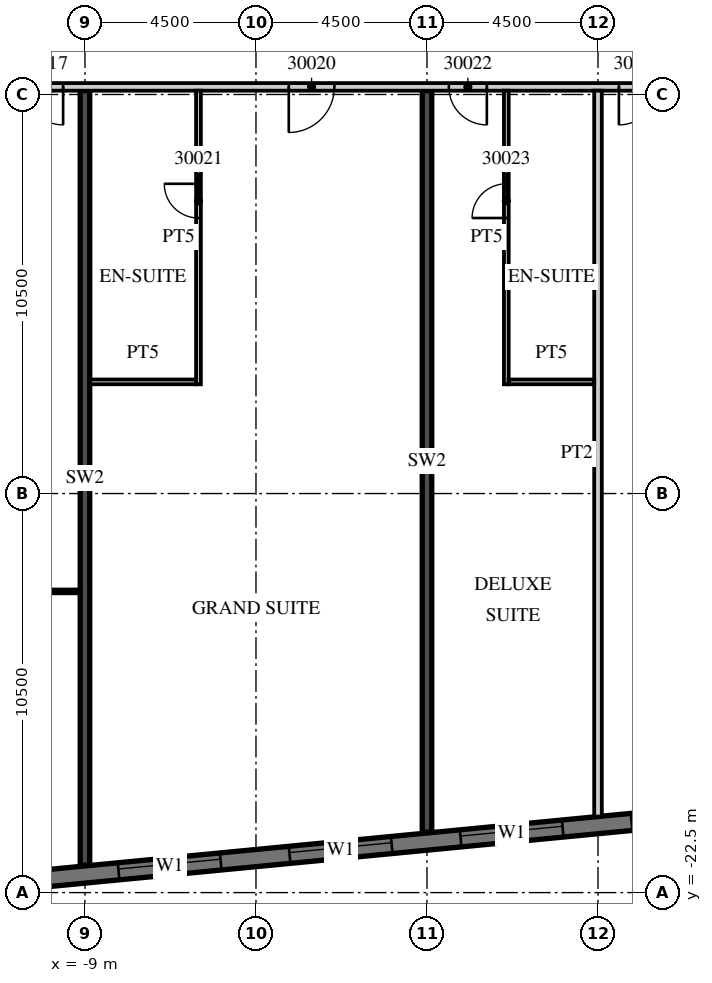
"""IFC4 building model, lengths in metres.
Left out: names, types, materials, properties, quantities, classifications, styles, units other than length and angle.
Written with IfcOpenShell. Run it as: python <this file> out.ifc"""

import sys

from ifc_helpers import new_model, si_unit, direction, frame, frame_2d, origin, place, context, subcontext, project, spatial, rectangle, extrude, element, fill, save


model = new_model("IFC4")
c1 = context("Model", 3, precision=1e-05, world=origin(), true_north=direction((0.0, 1.0)))
c2 = subcontext(c1, "Body", "Model", "MODEL_VIEW")
j1 = project(units=[si_unit("LENGTHUNIT", "METRE"), si_unit("PLANEANGLEUNIT", "RADIAN")], contexts=[c1])
p1 = place(None, origin())
s1 = spatial("IfcSite", under=j1, at=p1, CompositionType="ELEMENT")
p2 = place(p1, origin())
s2 = spatial("IfcBuilding", under=s1, at=p2, CompositionType="ELEMENT")
p3 = place(p2, frame((0.0, 0.0, 133.9)))
s3 = spatial("IfcBuildingStorey", under=s2, at=p3, CompositionType="ELEMENT", Elevation=133.9)
p4 = place(p3, frame((-9.0, -21.777, 0.0), z_axis=(0.0, 0.0, 1.0), x_axis=(0.0, 1.0, 0.0)))
e1 = element("IfcWall", 1, at=p4, inside=s3, PredefinedType="SHEAR", context=c2, shape_type="SweptSolid", body=[
    extrude(rectangle(XDim=20.377, YDim=0.25, at=frame_2d((10.188, 0.0))), origin(), (0.0, 0.0, 1.0), 3.3),
])
p5 = place(p3, frame((0.0, -20.91, 0.0), z_axis=(0.0, 0.0, 1.0), x_axis=(0.0, 1.0, 0.0)))
e2 = element("IfcWall", 2, at=p5, inside=s3, PredefinedType="SHEAR", context=c2, shape_type="SweptSolid", body=[
    extrude(rectangle(XDim=19.51, YDim=0.25, at=frame_2d((9.755, 0.0))), origin(), (0.0, 0.0, 1.0), 3.3),
])
p6 = place(p3, frame((-13.521, -22.46, 0.0), z_axis=(0.0, 0.0, 1.0), x_axis=(0.995396096335, 0.095846812164, 0.0)))
e3 = element("IfcWall", 3, at=p6, inside=s3, PredefinedType="SOLIDWALL", context=c2, shape_type="SweptSolid", body=[
    extrude(rectangle(XDim=59.151, YDim=0.45, at=frame_2d((29.575, 0.0))), origin(), (0.0, 0.0, 1.0), 3.02),
])
p7 = place(p6, frame((0.91, 0.0, 0.45)))
e4 = element("IfcOpeningElement", 4, at=p7, cuts=e3, PredefinedType="OPENING", context=c2, shape_type="SweptSolid", body=[
    extrude(rectangle(XDim=2.7, YDim=2.25, at=frame_2d((1.35, 1.125))), frame((0.0, 0.235, 0.0), z_axis=(0.0, -1.0, 0.0), x_axis=(1.0, 0.0, 0.0)), (0.0, 0.0, 1.0), 0.47),
])
p8 = place(p6, frame((5.431, 0.0, 0.45)))
e5 = element("IfcOpeningElement", 5, at=p8, cuts=e3, PredefinedType="OPENING", context=c2, shape_type="SweptSolid", body=[
    extrude(rectangle(XDim=2.7, YDim=2.25, at=frame_2d((1.35, 1.125))), frame((0.0, 0.235, 0.0), z_axis=(0.0, -1.0, 0.0), x_axis=(1.0, 0.0, 0.0)), (0.0, 0.0, 1.0), 0.47),
])
p9 = place(p6, frame((9.952, 0.0, 0.45)))
e6 = element("IfcOpeningElement", 6, at=p9, cuts=e3, PredefinedType="OPENING", context=c2, shape_type="SweptSolid", body=[
    extrude(rectangle(XDim=2.7, YDim=2.25, at=frame_2d((1.35, 1.125))), frame((0.0, 0.235, 0.0), z_axis=(0.0, -1.0, 0.0), x_axis=(1.0, 0.0, 0.0)), (0.0, 0.0, 1.0), 0.47),
])
p10 = place(p6, frame((14.473, 0.0, 0.45)))
e7 = element("IfcOpeningElement", 7, at=p10, cuts=e3, PredefinedType="OPENING", context=c2, shape_type="SweptSolid", body=[
    extrude(rectangle(XDim=2.7, YDim=2.25, at=frame_2d((1.35, 1.125))), frame((0.0, 0.235, 0.0), z_axis=(0.0, -1.0, 0.0), x_axis=(1.0, 0.0, 0.0)), (0.0, 0.0, 1.0), 0.47),
])
p11 = place(p6, frame((18.994, 0.0, 0.45)))
e8 = element("IfcOpeningElement", 8, at=p11, cuts=e3, PredefinedType="OPENING", context=c2, shape_type="SweptSolid", body=[
    extrude(rectangle(XDim=2.7, YDim=2.25, at=frame_2d((1.35, 1.125))), frame((0.0, 0.235, 0.0), z_axis=(0.0, -1.0, 0.0), x_axis=(1.0, 0.0, 0.0)), (0.0, 0.0, 1.0), 0.47),
])
p12 = place(p6, frame((23.514, 0.0, 0.45)))
e9 = element("IfcOpeningElement", 9, at=p12, cuts=e3, PredefinedType="OPENING", context=c2, shape_type="SweptSolid", body=[
    extrude(rectangle(XDim=2.7, YDim=2.25, at=frame_2d((1.35, 1.125))), frame((0.0, 0.235, 0.0), z_axis=(0.0, -1.0, 0.0), x_axis=(1.0, 0.0, 0.0)), (0.0, 0.0, 1.0), 0.47),
])
p13 = place(p6, frame((28.035, 0.0, 0.45)))
e10 = element("IfcOpeningElement", 10, at=p13, cuts=e3, PredefinedType="OPENING", context=c2, shape_type="SweptSolid", body=[
    extrude(rectangle(XDim=2.7, YDim=2.25, at=frame_2d((1.35, 1.125))), frame((0.0, 0.235, 0.0), z_axis=(0.0, -1.0, 0.0), x_axis=(1.0, 0.0, 0.0)), (0.0, 0.0, 1.0), 0.47),
])
p14 = place(p6, frame((32.556, 0.0, 0.45)))
e11 = element("IfcOpeningElement", 11, at=p14, cuts=e3, PredefinedType="OPENING", context=c2, shape_type="SweptSolid", body=[
    extrude(rectangle(XDim=2.7, YDim=2.25, at=frame_2d((1.35, 1.125))), frame((0.0, 0.235, 0.0), z_axis=(0.0, -1.0, 0.0), x_axis=(1.0, 0.0, 0.0)), (0.0, 0.0, 1.0), 0.47),
])
p15 = place(p6, frame((37.077, 0.0, 0.45)))
e12 = element("IfcOpeningElement", 12, at=p15, cuts=e3, PredefinedType="OPENING", context=c2, shape_type="SweptSolid", body=[
    extrude(rectangle(XDim=2.7, YDim=2.25, at=frame_2d((1.35, 1.125))), frame((0.0, 0.235, 0.0), z_axis=(0.0, -1.0, 0.0), x_axis=(1.0, 0.0, 0.0)), (0.0, 0.0, 1.0), 0.47),
])
p16 = place(p6, frame((41.598, 0.0, 0.45)))
e13 = element("IfcOpeningElement", 13, at=p16, cuts=e3, PredefinedType="OPENING", context=c2, shape_type="SweptSolid", body=[
    extrude(rectangle(XDim=2.7, YDim=2.25, at=frame_2d((1.35, 1.125))), frame((0.0, 0.235, 0.0), z_axis=(0.0, -1.0, 0.0), x_axis=(1.0, 0.0, 0.0)), (0.0, 0.0, 1.0), 0.47),
])
p17 = place(p6, frame((46.118, 0.0, 0.45)))
e14 = element("IfcOpeningElement", 14, at=p17, cuts=e3, PredefinedType="OPENING", context=c2, shape_type="SweptSolid", body=[
    extrude(rectangle(XDim=2.7, YDim=2.25, at=frame_2d((1.35, 1.125))), frame((0.0, 0.235, 0.0), z_axis=(0.0, -1.0, 0.0), x_axis=(1.0, 0.0, 0.0)), (0.0, 0.0, 1.0), 0.47),
])
p18 = place(p6, frame((50.639, 0.0, 0.45)))
e15 = element("IfcOpeningElement", 15, at=p18, cuts=e3, PredefinedType="OPENING", context=c2, shape_type="SweptSolid", body=[
    extrude(rectangle(XDim=2.7, YDim=2.25, at=frame_2d((1.35, 1.125))), frame((0.0, 0.235, 0.0), z_axis=(0.0, -1.0, 0.0), x_axis=(1.0, 0.0, 0.0)), (0.0, 0.0, 1.0), 0.47),
])
p19 = place(p6, frame((55.15, 0.0, 0.45)))
e16 = element("IfcOpeningElement", 16, at=p19, cuts=e3, PredefinedType="OPENING", context=c2, shape_type="SweptSolid", body=[
    extrude(rectangle(XDim=2.7, YDim=2.25, at=frame_2d((1.35, 1.125))), frame((0.0, 0.235, 0.0), z_axis=(0.0, -1.0, 0.0), x_axis=(1.0, 0.0, 0.0)), (0.0, 0.0, 1.0), 0.47),
])
p20 = place(p3, frame((-13.5, -1.3, 0.0), z_axis=(0.0, 0.0, 1.0), x_axis=(1.0, 0.0, 0.0)))
e17 = element("IfcWall", 17, at=p20, inside=s3, PredefinedType="PARTITIONING", context=c2, shape_type="SweptSolid", body=[
    extrude(rectangle(XDim=60.932, YDim=0.2, at=frame_2d((30.466, 0.0))), origin(), (0.0, 0.0, 1.0), 3.02),
])
p21 = place(p20, frame((2.925, 0.0, 0.0)))
e18 = element("IfcOpeningElement", 18, at=p21, cuts=e17, PredefinedType="OPENING", context=c2, shape_type="SweptSolid", body=[
    extrude(rectangle(XDim=1.0, YDim=2.1, at=frame_2d((0.5, 1.05))), frame((0.0, 0.11, 0.0), z_axis=(0.0, -1.0, 0.0), x_axis=(1.0, 0.0, 0.0)), (0.0, 0.0, 1.0), 0.22),
])
p22 = place(p20, frame((9.863, 0.0, 0.0)))
e19 = element("IfcOpeningElement", 19, at=p22, cuts=e17, PredefinedType="OPENING", context=c2, shape_type="SweptSolid", body=[
    extrude(rectangle(XDim=1.2, YDim=2.1, at=frame_2d((0.6, 1.05))), frame((0.0, 0.11, 0.0), z_axis=(0.0, -1.0, 0.0), x_axis=(1.0, 0.0, 0.0)), (0.0, 0.0, 1.0), 0.22),
])
p23 = place(p20, frame((14.075, 0.0, 0.0)))
e20 = element("IfcOpeningElement", 20, at=p23, cuts=e17, PredefinedType="OPENING", context=c2, shape_type="SweptSolid", body=[
    extrude(rectangle(XDim=1.0, YDim=2.1, at=frame_2d((0.5, 1.05))), frame((0.0, 0.11, 0.0), z_axis=(0.0, -1.0, 0.0), x_axis=(1.0, 0.0, 0.0)), (0.0, 0.0, 1.0), 0.22),
])
p24 = place(p20, frame((18.55, 0.0, 0.0)))
e21 = element("IfcOpeningElement", 21, at=p24, cuts=e17, PredefinedType="OPENING", context=c2, shape_type="SweptSolid", body=[
    extrude(rectangle(XDim=1.0, YDim=2.1, at=frame_2d((0.5, 1.05))), frame((0.0, 0.11, 0.0), z_axis=(0.0, -1.0, 0.0), x_axis=(1.0, 0.0, 0.0)), (0.0, 0.0, 1.0), 0.22),
])
p25 = place(p20, frame((24.938, 0.0, 0.0)))
e22 = element("IfcOpeningElement", 22, at=p25, cuts=e17, PredefinedType="OPENING", context=c2, shape_type="SweptSolid", body=[
    extrude(rectangle(XDim=1.2, YDim=2.1, at=frame_2d((0.6, 1.05))), frame((0.0, 0.11, 0.0), z_axis=(0.0, -1.0, 0.0), x_axis=(1.0, 0.0, 0.0)), (0.0, 0.0, 1.0), 0.22),
])
p26 = place(p20, frame((36.862, 0.0, 0.0)))
e23 = element("IfcOpeningElement", 23, at=p26, cuts=e17, PredefinedType="OPENING", context=c2, shape_type="SweptSolid", body=[
    extrude(rectangle(XDim=1.2, YDim=2.1, at=frame_2d((0.6, 1.05))), frame((0.0, 0.11, 0.0), z_axis=(0.0, -1.0, 0.0), x_axis=(1.0, 0.0, 0.0)), (0.0, 0.0, 1.0), 0.22),
])
p27 = place(p20, frame((41.075, 0.0, 0.0)))
e24 = element("IfcOpeningElement", 24, at=p27, cuts=e17, PredefinedType="OPENING", context=c2, shape_type="SweptSolid", body=[
    extrude(rectangle(XDim=1.0, YDim=2.1, at=frame_2d((0.5, 1.05))), frame((0.0, 0.11, 0.0), z_axis=(0.0, -1.0, 0.0), x_axis=(1.0, 0.0, 0.0)), (0.0, 0.0, 1.0), 0.22),
])
p28 = place(p20, frame((45.55, 0.0, 0.0)))
e25 = element("IfcOpeningElement", 25, at=p28, cuts=e17, PredefinedType="OPENING", context=c2, shape_type="SweptSolid", body=[
    extrude(rectangle(XDim=1.0, YDim=2.1, at=frame_2d((0.5, 1.05))), frame((0.0, 0.11, 0.0), z_axis=(0.0, -1.0, 0.0), x_axis=(1.0, 0.0, 0.0)), (0.0, 0.0, 1.0), 0.22),
])
p29 = place(p20, frame((52.425, 0.0, 0.0)))
e26 = element("IfcOpeningElement", 26, at=p29, cuts=e17, PredefinedType="OPENING", context=c2, shape_type="SweptSolid", body=[
    extrude(rectangle(XDim=1.0, YDim=2.1, at=frame_2d((0.5, 1.05))), frame((0.0, 0.11, 0.0), z_axis=(0.0, -1.0, 0.0), x_axis=(1.0, 0.0, 0.0)), (0.0, 0.0, 1.0), 0.22),
])
p30 = place(p20, frame((56.95, 0.0, 0.0)))
e27 = element("IfcOpeningElement", 27, at=p30, cuts=e17, PredefinedType="OPENING", context=c2, shape_type="SweptSolid", body=[
    extrude(rectangle(XDim=1.0, YDim=2.1, at=frame_2d((0.5, 1.05))), frame((0.0, 0.11, 0.0), z_axis=(0.0, -1.0, 0.0), x_axis=(1.0, 0.0, 0.0)), (0.0, 0.0, 1.0), 0.22),
])
p31 = place(p20, frame((59.882, 0.0, 0.0)))
e28 = element("IfcOpeningElement", 28, at=p31, cuts=e17, PredefinedType="OPENING", context=c2, shape_type="SweptSolid", body=[
    extrude(rectangle(XDim=0.9, YDim=2.1, at=frame_2d((0.45, 1.05))), frame((0.0, 0.11, 0.0), z_axis=(0.0, -1.0, 0.0), x_axis=(1.0, 0.0, 0.0)), (0.0, 0.0, 1.0), 0.22),
])
p32 = place(p3, frame((-13.4, -14.575, 0.0), z_axis=(0.0, 0.0, 1.0), x_axis=(1.0, 0.0, 0.0)))
e29 = element("IfcWall", 29, at=p32, inside=s3, PredefinedType="PARTITIONING", context=c2, shape_type="SweptSolid", body=[
    extrude(rectangle(XDim=4.275, YDim=0.1, at=frame_2d((2.137, 0.0))), origin(), (0.0, 0.0, 1.0), 3.02),
])
p33 = place(p32, frame((0.788, 0.0, 0.0)))
e30 = element("IfcOpeningElement", 30, at=p33, cuts=e29, PredefinedType="OPENING", context=c2, shape_type="SweptSolid", body=[
    extrude(rectangle(XDim=1.5, YDim=2.1, at=frame_2d((0.75, 1.05))), frame((0.0, 0.06, 0.0), z_axis=(0.0, -1.0, 0.0), x_axis=(1.0, 0.0, 0.0)), (0.0, 0.0, 1.0), 0.12),
])
p34 = place(p3, frame((-6.013, -9.125, 0.0), z_axis=(0.0, 0.0, 1.0), x_axis=(0.0, 1.0, 0.0)))
e31 = element("IfcWall", 31, at=p34, inside=s3, PredefinedType="PARTITIONING", context=c2, shape_type="SweptSolid", body=[
    extrude(rectangle(XDim=7.725, YDim=0.125, at=frame_2d((3.863, 0.0))), origin(), (0.0, 0.0, 1.0), 3.02),
])
p35 = place(p34, frame((4.375, 0.0, 0.0)))
e32 = element("IfcOpeningElement", 32, at=p35, cuts=e31, PredefinedType="OPENING", context=c2, shape_type="SweptSolid", body=[
    extrude(rectangle(XDim=0.9, YDim=2.1, at=frame_2d((0.45, 1.05))), frame((0.0, 0.073, 0.0), z_axis=(0.0, -1.0, 0.0), x_axis=(1.0, 0.0, 0.0)), (0.0, 0.0, 1.0), 0.145),
])
p36 = place(p3, frame((-8.875, -9.062, 0.0), z_axis=(0.0, 0.0, 1.0), x_axis=(1.0, 0.0, 0.0)))
e33 = element("IfcWall", 33, at=p36, inside=s3, PredefinedType="PARTITIONING", context=c2, shape_type="SweptSolid", body=[
    extrude(rectangle(XDim=2.8, YDim=0.125, at=frame_2d((1.4, 0.0))), origin(), (0.0, 0.0, 1.0), 3.02),
])
p37 = place(p3, frame((4.5, -20.499, 0.0), z_axis=(0.0, 0.0, 1.0), x_axis=(0.0, 1.0, 0.0)))
e34 = element("IfcWall", 34, at=p37, inside=s3, PredefinedType="PARTITIONING", context=c2, shape_type="SweptSolid", body=[
    extrude(rectangle(XDim=19.099, YDim=0.2, at=frame_2d((9.55, 0.0))), origin(), (0.0, 0.0, 1.0), 3.02),
])
p38 = place(p3, frame((2.087, -9.125, 0.0), z_axis=(0.0, 0.0, 1.0), x_axis=(0.0, 1.0, 0.0)))
e35 = element("IfcWall", 35, at=p38, inside=s3, PredefinedType="PARTITIONING", context=c2, shape_type="SweptSolid", body=[
    extrude(rectangle(XDim=7.725, YDim=0.125, at=frame_2d((3.863, 0.0))), origin(), (0.0, 0.0, 1.0), 3.02),
])
p39 = place(p38, frame((4.375, 0.0, 0.0)))
e36 = element("IfcOpeningElement", 36, at=p39, cuts=e35, PredefinedType="OPENING", context=c2, shape_type="SweptSolid", body=[
    extrude(rectangle(XDim=0.9, YDim=2.1, at=frame_2d((0.45, 1.05))), frame((0.0, 0.073, 0.0), z_axis=(0.0, -1.0, 0.0), x_axis=(1.0, 0.0, 0.0)), (0.0, 0.0, 1.0), 0.145),
])
p40 = place(p3, frame((2.15, -9.062, 0.0), z_axis=(0.0, 0.0, 1.0), x_axis=(1.0, 0.0, 0.0)))
e37 = element("IfcWall", 37, at=p40, inside=s3, PredefinedType="PARTITIONING", context=c2, shape_type="SweptSolid", body=[
    extrude(rectangle(XDim=2.25, YDim=0.125, at=frame_2d((1.125, 0.0))), origin(), (0.0, 0.0, 1.0), 3.02),
])
p41 = place(p8, origin())
e38 = element("IfcWindow", 38, at=p41, inside=s3, PartitioningType="SINGLE_PANEL", PredefinedType="WINDOW", context=c2, shape_type="SweptSolid", body=[
    extrude(rectangle(XDim=2.7, YDim=2.25, at=frame_2d((1.35, 1.125))), frame((0.0, 0.09, 0.0), z_axis=(0.0, -1.0, 0.0), x_axis=(1.0, 0.0, 0.0)), (0.0, 0.0, 1.0), 0.06),
])
fill(e5, e38)
p42 = place(p9, origin())
e39 = element("IfcWindow", 39, at=p42, inside=s3, PartitioningType="SINGLE_PANEL", PredefinedType="WINDOW", context=c2, shape_type="SweptSolid", body=[
    extrude(rectangle(XDim=2.7, YDim=2.25, at=frame_2d((1.35, 1.125))), frame((0.0, 0.09, 0.0), z_axis=(0.0, -1.0, 0.0), x_axis=(1.0, 0.0, 0.0)), (0.0, 0.0, 1.0), 0.06),
])
fill(e6, e39)
p43 = place(p10, origin())
e40 = element("IfcWindow", 40, at=p43, inside=s3, PartitioningType="SINGLE_PANEL", PredefinedType="WINDOW", context=c2, shape_type="SweptSolid", body=[
    extrude(rectangle(XDim=2.7, YDim=2.25, at=frame_2d((1.35, 1.125))), frame((0.0, 0.09, 0.0), z_axis=(0.0, -1.0, 0.0), x_axis=(1.0, 0.0, 0.0)), (0.0, 0.0, 1.0), 0.06),
])
fill(e7, e40)
p44 = place(p11, origin())
e41 = element("IfcWindow", 41, at=p44, inside=s3, PartitioningType="SINGLE_PANEL", PredefinedType="WINDOW", context=c2, shape_type="SweptSolid", body=[
    extrude(rectangle(XDim=2.7, YDim=2.25, at=frame_2d((1.35, 1.125))), frame((0.0, 0.09, 0.0), z_axis=(0.0, -1.0, 0.0), x_axis=(1.0, 0.0, 0.0)), (0.0, 0.0, 1.0), 0.06),
])
fill(e8, e41)
p45 = place(p21, origin())
e42 = element("IfcDoor", 42, at=p45, inside=s3, OperationType="SINGLE_SWING_RIGHT", PredefinedType="DOOR", context=c2, shape_type="SweptSolid", body=[
    extrude(rectangle(XDim=1.0, YDim=2.1, at=frame_2d((0.5, 1.05))), frame((0.0, 0.025, 0.0), z_axis=(0.0, -1.0, 0.0), x_axis=(1.0, 0.0, 0.0)), (0.0, 0.0, 1.0), 0.05),
])
fill(e18, e42)
p46 = place(p22, origin())
e43 = element("IfcDoor", 43, at=p46, inside=s3, OperationType="SINGLE_SWING_LEFT", PredefinedType="DOOR", context=c2, shape_type="SweptSolid", body=[
    extrude(rectangle(XDim=1.2, YDim=2.1, at=frame_2d((0.6, 1.05))), frame((0.0, 0.025, 0.0), z_axis=(0.0, -1.0, 0.0), x_axis=(1.0, 0.0, 0.0)), (0.0, 0.0, 1.0), 0.05),
])
fill(e19, e43)
p47 = place(p35, origin())
e44 = element("IfcDoor", 44, at=p47, inside=s3, OperationType="SINGLE_SWING_RIGHT", PredefinedType="DOOR", context=c2, shape_type="SweptSolid", body=[
    extrude(rectangle(XDim=0.9, YDim=2.1, at=frame_2d((0.45, 1.05))), frame((0.0, 0.025, 0.0), z_axis=(0.0, -1.0, 0.0), x_axis=(1.0, 0.0, 0.0)), (0.0, 0.0, 1.0), 0.05),
])
fill(e32, e44)
p48 = place(p23, origin())
e45 = element("IfcDoor", 45, at=p48, inside=s3, OperationType="SINGLE_SWING_RIGHT", PredefinedType="DOOR", context=c2, shape_type="SweptSolid", body=[
    extrude(rectangle(XDim=1.0, YDim=2.1, at=frame_2d((0.5, 1.05))), frame((0.0, 0.025, 0.0), z_axis=(0.0, -1.0, 0.0), x_axis=(1.0, 0.0, 0.0)), (0.0, 0.0, 1.0), 0.05),
])
fill(e20, e45)
p49 = place(p39, origin())
e46 = element("IfcDoor", 46, at=p49, inside=s3, OperationType="SINGLE_SWING_LEFT", PredefinedType="DOOR", context=c2, shape_type="SweptSolid", body=[
    extrude(rectangle(XDim=0.9, YDim=2.1, at=frame_2d((0.45, 1.05))), frame((0.0, 0.025, 0.0), z_axis=(0.0, -1.0, 0.0), x_axis=(1.0, 0.0, 0.0)), (0.0, 0.0, 1.0), 0.05),
])
fill(e36, e46)
p50 = place(p24, origin())
e47 = element("IfcDoor", 47, at=p50, inside=s3, OperationType="SINGLE_SWING_LEFT", PredefinedType="DOOR", context=c2, shape_type="SweptSolid", body=[
    extrude(rectangle(XDim=1.0, YDim=2.1, at=frame_2d((0.5, 1.05))), frame((0.0, 0.025, 0.0), z_axis=(0.0, -1.0, 0.0), x_axis=(1.0, 0.0, 0.0)), (0.0, 0.0, 1.0), 0.05),
])
fill(e21, e47)
save(model, sys.argv[1])
